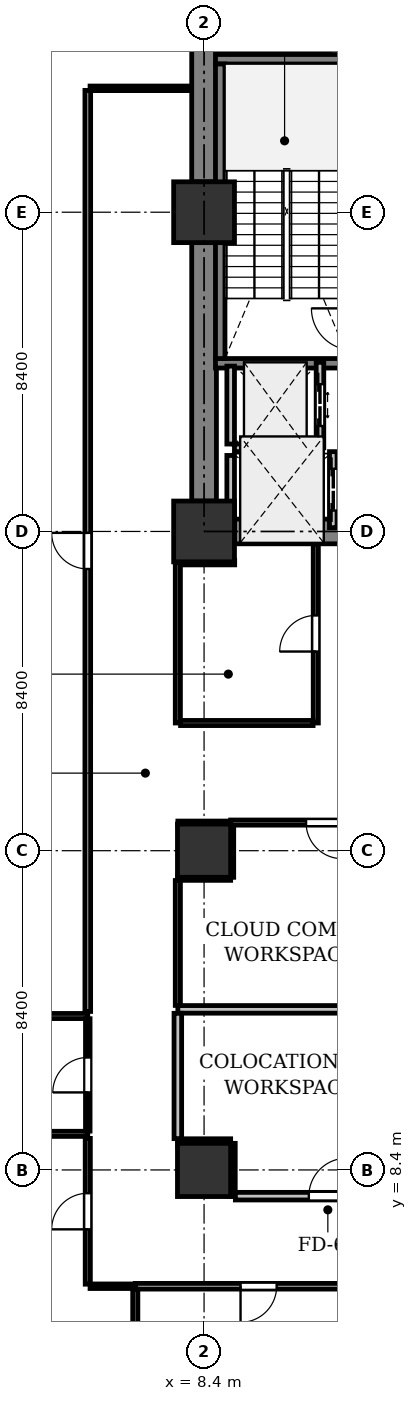
"""IFC4 building model, lengths in metres.
Left out: names, types, materials, properties, quantities, classifications, styles, units other than length and angle.
Written with IfcOpenShell. Run it as: python <this file> out.ifc"""

import sys

from ifc_helpers import new_model, si_unit, direction, frame, frame_2d, origin, origin_2d, place, context, subcontext, project, spatial, rectangle, extrude, element, fill, save


model = new_model("IFC4")
c1 = context("Model", 3, precision=1e-05, world=origin(), true_north=direction((0.0, 1.0)))
c2 = subcontext(c1, "Body", "Model", "MODEL_VIEW")
j1 = project(units=[si_unit("LENGTHUNIT", "METRE"), si_unit("PLANEANGLEUNIT", "RADIAN")], contexts=[c1])
p1 = place(None, origin())
s1 = spatial("IfcSite", under=j1, at=p1, CompositionType="ELEMENT")
p2 = place(p1, origin())
s2 = spatial("IfcBuilding", under=s1, at=p2, CompositionType="ELEMENT")
p3 = place(p2, frame((0.0, 0.0, 15.0)))
s3 = spatial("IfcBuildingStorey", under=s2, at=p3, CompositionType="ELEMENT", Elevation=15.0)
for number, where, z_axis, x_axis in (
    (1, (8.4, 8.4, 0.0), (0.0, 0.0, 1.0), (1.0, 0.0, 0.0)),
    (2, (8.4, 16.8, 0.0), (0.0, 0.0, 1.0), (1.0, 0.0, 0.0)),
):
    element("IfcColumn", number, at=place(p3, frame(where, z_axis=z_axis, x_axis=x_axis)), inside=s3, PredefinedType="COLUMN", context=c2, shape_type="SweptSolid", body=[
        extrude(rectangle(XDim=1.4, YDim=1.4, at=origin_2d()), origin(), (0.0, 0.0, 1.0), 4.8),
    ])
for number, where, z_axis, x_axis in (
    (3, (8.4, 25.2, 0.0), (0.0, 0.0, 1.0), (1.0, 0.0, 0.0)),
    (4, (8.4, 33.6, 0.0), (0.0, 0.0, 1.0), (1.0, 0.0, 0.0)),
):
    element("IfcColumn", number, at=place(p3, frame(where, z_axis=z_axis, x_axis=x_axis)), inside=s3, PredefinedType="COLUMN", context=c2, shape_type="SweptSolid", body=[
        extrude(rectangle(XDim=1.6, YDim=1.6, at=origin_2d()), origin(), (0.0, 0.0, 1.0), 4.8),
    ])
for number, where, z_axis, x_axis in (
    (5, (8.4, 26.0, 0.0), (0.0, 0.0, 1.0), (0.0, 1.0, 0.0)),
    (6, (8.4, 34.4, 0.0), (0.0, 0.0, 1.0), (0.0, 1.0, 0.0)),
):
    element("IfcWall", number, at=place(p3, frame(where, z_axis=z_axis, x_axis=x_axis)), inside=s3, PredefinedType="SHEAR", context=c2, shape_type="SweptSolid", body=[
        extrude(rectangle(XDim=6.8, YDim=0.65, at=frame_2d((3.4, 0.0))), origin(), (0.0, 0.0, 1.0), 4.45),
    ])
p4 = place(p3, frame((9.2, 25.2, 0.0), z_axis=(0.0, 0.0, 1.0), x_axis=(1.0, 0.0, 0.0)))
e7 = element("IfcWall", 7, at=p4, inside=s3, PredefinedType="SHEAR", context=c2, shape_type="SweptSolid", body=[
    extrude(rectangle(XDim=6.8, YDim=0.65, at=frame_2d((3.4, 0.0))), origin(), (0.0, 0.0, 1.0), 4.45),
])
p5 = place(p4, frame((3.5, 0.0, 0.0)))
e8 = element("IfcOpeningElement", 8, at=p5, cuts=e7, PredefinedType="OPENING", context=c2, shape_type="SweptSolid", body=[
    extrude(rectangle(XDim=1.1, YDim=2.15, at=frame_2d((0.55, 1.075))), frame((0.0, 0.335, 0.0), z_axis=(0.0, -1.0, 0.0), x_axis=(1.0, 0.0, 0.0)), (0.0, 0.0, 1.0), 0.67),
])
for number, where, z_axis, x_axis in (
    (9, (12.45, 29.625, 0.0), (0.0, 0.0, 1.0), (-1.0, 0.0, 0.0)),
    (10, (12.45, 37.625, 0.0), (0.0, 0.0, 1.0), (-1.0, 0.0, 0.0)),
):
    element("IfcWall", number, at=place(p3, frame(where, z_axis=z_axis, x_axis=x_axis)), inside=s3, PredefinedType="SHEAR", context=c2, shape_type="SweptSolid", body=[
        extrude(rectangle(XDim=3.75, YDim=0.25, at=frame_2d((1.875, 0.0))), origin(), (0.0, 0.0, 1.0), 4.45),
    ])
p6 = place(p3, frame((8.825, 29.75, 0.0), z_axis=(0.0, 0.0, 1.0), x_axis=(0.0, 1.0, 0.0)))
e11 = element("IfcWall", 11, at=p6, inside=s3, PredefinedType="SHEAR", context=c2, shape_type="SweptSolid", body=[
    extrude(rectangle(XDim=7.75, YDim=0.25, at=frame_2d((3.875, 0.0))), origin(), (0.0, 0.0, 1.0), 4.45),
])
p7 = place(p3, frame((11.45, 27.4, 0.0), z_axis=(0.0, 0.0, 1.0), x_axis=(0.0, 1.0, 0.0)))
e12 = element("IfcWall", 12, at=p7, inside=s3, PredefinedType="PARTITIONING", context=c2, shape_type="SweptSolid", body=[
    extrude(rectangle(XDim=2.25, YDim=0.2, at=frame_2d((1.125, 0.0))), origin(), (0.0, 0.0, 1.0), 4.45),
])
p8 = place(p7, frame((0.575, 0.0, 0.0)))
e13 = element("IfcOpeningElement", 13, at=p8, cuts=e12, PredefinedType="OPENING", context=c2, shape_type="SweptSolid", body=[
    extrude(rectangle(XDim=1.1, YDim=2.2, at=frame_2d((0.55, 1.1))), frame((0.0, 0.11, 0.0), z_axis=(0.0, -1.0, 0.0), x_axis=(1.0, 0.0, 0.0)), (0.0, 0.0, 1.0), 0.22),
])
p9 = place(p3, frame((9.1, 27.5, 0.0), z_axis=(0.0, 0.0, 1.0), x_axis=(0.0, 1.0, 0.0)))
e14 = element("IfcWall", 14, at=p9, inside=s3, PredefinedType="PARTITIONING", context=c2, shape_type="SweptSolid", body=[
    extrude(rectangle(XDim=2.05, YDim=0.2, at=frame_2d((1.025, 0.0))), origin(), (0.0, 0.0, 1.0), 4.45),
])
p10 = place(p3, frame((9.2, 27.4, 0.0), z_axis=(0.0, 0.0, 1.0), x_axis=(1.0, 0.0, 0.0)))
e15 = element("IfcWall", 15, at=p10, inside=s3, PredefinedType="PARTITIONING", context=c2, shape_type="SweptSolid", body=[
    extrude(rectangle(XDim=2.15, YDim=0.2, at=frame_2d((1.075, 0.0))), origin(), (0.0, 0.0, 1.0), 4.45),
])
p11 = place(p3, frame((11.8, 25.3, 0.0), z_axis=(0.0, 0.0, 1.0), x_axis=(0.0, 1.0, 0.0)))
e16 = element("IfcWall", 16, at=p11, inside=s3, PredefinedType="PARTITIONING", context=c2, shape_type="SweptSolid", body=[
    extrude(rectangle(XDim=2.0, YDim=0.2, at=frame_2d((1.0, 0.0))), origin(), (0.0, 0.0, 1.0), 4.45),
])
p12 = place(p11, frame((0.45, 0.0, 0.0)))
e17 = element("IfcOpeningElement", 17, at=p12, cuts=e16, PredefinedType="OPENING", context=c2, shape_type="SweptSolid", body=[
    extrude(rectangle(XDim=1.1, YDim=2.2, at=frame_2d((0.55, 1.1))), frame((0.0, 0.11, 0.0), z_axis=(0.0, -1.0, 0.0), x_axis=(1.0, 0.0, 0.0)), (0.0, 0.0, 1.0), 0.22),
])
p13 = place(p3, frame((9.1, 25.4, 0.0), z_axis=(0.0, 0.0, 1.0), x_axis=(0.0, 1.0, 0.0)))
e18 = element("IfcWall", 18, at=p13, inside=s3, PredefinedType="PARTITIONING", context=c2, shape_type="SweptSolid", body=[
    extrude(rectangle(XDim=1.8, YDim=0.2, at=frame_2d((0.9, 0.0))), origin(), (0.0, 0.0, 1.0), 4.45),
])
for number, where, z_axis, x_axis in (
    (19, (5.34, 12.45, 0.0), (0.0, 0.0, 1.0), (-1.0, 0.0, 0.0)),
    (20, (0.169, 9.35, 0.0), (0.0, 0.0, 1.0), (1.0, 0.0, 0.0)),
):
    element("IfcWall", number, at=place(p3, frame(where, z_axis=z_axis, x_axis=x_axis)), inside=s3, PredefinedType="PARTITIONING", context=c2, shape_type="SweptSolid", body=[
        extrude(rectangle(XDim=5.171, YDim=0.135, at=frame_2d((2.585, 0.0))), origin(), (0.0, 0.0, 1.0), 3.25),
    ])
p14 = place(p3, frame((5.34, 9.421, 0.0), z_axis=(0.0, 0.0, 1.0), x_axis=(0.0, 1.0, 0.0)))
e21 = element("IfcWall", 21, at=p14, inside=s3, PredefinedType="PARTITIONING", context=c2, shape_type="SweptSolid", body=[
    extrude(rectangle(XDim=2.957, YDim=0.12, at=frame_2d((1.479, 0.0))), origin(), (0.0, 0.0, 1.0), 4.45),
])
p15 = place(p14, frame((1.019, 0.0, 0.0)))
e22 = element("IfcOpeningElement", 22, at=p15, cuts=e21, PredefinedType="OPENING", context=c2, shape_type="SweptSolid", body=[
    extrude(rectangle(XDim=0.92, YDim=2.1, at=frame_2d((0.46, 1.05))), frame((0.0, 0.07, 0.0), z_axis=(0.0, -1.0, 0.0), x_axis=(1.0, 0.0, 0.0)), (0.0, 0.0, 1.0), 0.14),
])
p16 = place(p3, frame((11.34, 20.16, 0.0), z_axis=(0.0, 0.0, 1.0), x_axis=(0.0, 1.0, 0.0)))
e23 = element("IfcWall", 23, at=p16, inside=s3, PredefinedType="PARTITIONING", context=c2, shape_type="SweptSolid", body=[
    extrude(rectangle(XDim=4.711, YDim=0.135, at=frame_2d((2.355, 0.0))), origin(), (0.0, 0.0, 1.0), 4.45),
])
p17 = place(p16, frame((1.881, 0.0, 0.0)))
e24 = element("IfcOpeningElement", 24, at=p17, cuts=e23, PredefinedType="OPENING", context=c2, shape_type="SweptSolid", body=[
    extrude(rectangle(XDim=0.95, YDim=2.15, at=frame_2d((0.475, 1.075))), frame((0.0, 0.077, 0.0), z_axis=(0.0, -1.0, 0.0), x_axis=(1.0, 0.0, 0.0)), (0.0, 0.0, 1.0), 0.155),
])
p18 = place(p3, frame((9.206, 24.381, 0.0), z_axis=(0.0, 0.0, 1.0), x_axis=(-0.999999786895, -0.00065284791, 0.0)))
e25 = element("IfcWall", 25, at=p18, inside=s3, PredefinedType="PARTITIONING", context=c2, shape_type="SweptSolid", body=[
    extrude(rectangle(XDim=1.496, YDim=0.12, at=frame_2d((0.748, 0.0))), origin(), (0.0, 0.0, 1.0), 3.25),
])
p19 = place(p3, frame((7.71, 24.38, 0.0), z_axis=(0.0, 0.0, 1.0), x_axis=(0.0, -1.0, 0.0)))
e26 = element("IfcWall", 26, at=p19, inside=s3, PredefinedType="PARTITIONING", context=c2, shape_type="SweptSolid", body=[
    extrude(rectangle(XDim=4.22, YDim=0.135, at=frame_2d((2.11, 0.0))), origin(), (0.0, 0.0, 1.0), 4.45),
])
p20 = place(p3, frame((7.781, 20.16, 0.0), z_axis=(0.0, 0.0, 1.0), x_axis=(1.0, 0.0, 0.0)))
e27 = element("IfcWall", 27, at=p20, inside=s3, PredefinedType="PARTITIONING", context=c2, shape_type="SweptSolid", body=[
    extrude(rectangle(XDim=3.487, YDim=0.135, at=frame_2d((1.744, 0.0))), origin(), (0.0, 0.0, 1.0), 3.25),
])
p21 = place(p3, frame((7.71, 9.12, 0.0), z_axis=(0.0, 0.0, 1.0), x_axis=(1.0, 0.0, 0.0)))
e28 = element("IfcWall", 28, at=p21, inside=s3, PredefinedType="PARTITIONING", context=c2, shape_type="SweptSolid", body=[
    extrude(rectangle(XDim=1.39, YDim=0.2, at=frame_2d((0.695, 0.0))), origin(), (0.0, 0.0, 1.0), 3.25),
])
p22 = place(p3, frame((9.12, 9.1, 0.0), z_axis=(0.0, 0.0, 1.0), x_axis=(0.0, -1.0, 0.0)))
e29 = element("IfcWall", 29, at=p22, inside=s3, PredefinedType="PARTITIONING", context=c2, shape_type="SweptSolid", body=[
    extrude(rectangle(XDim=1.39, YDim=0.2, at=frame_2d((0.695, 0.0))), origin(), (0.0, 0.0, 1.0), 3.05),
])
p23 = place(p3, frame((9.224, 7.71, 0.0), z_axis=(0.0, 0.0, 1.0), x_axis=(1.0, 0.0, 0.0)))
e30 = element("IfcWall", 30, at=p23, inside=s3, PredefinedType="PARTITIONING", context=c2, shape_type="SweptSolid", body=[
    extrude(rectangle(XDim=4.866, YDim=0.2, at=frame_2d((2.433, 0.0))), origin(), (0.0, 0.0, 1.0), 4.044),
])
p24 = place(p23, frame((1.933, 0.0, 0.0)))
e31 = element("IfcOpeningElement", 31, at=p24, cuts=e30, PredefinedType="OPENING", context=c2, shape_type="SweptSolid", body=[
    extrude(rectangle(XDim=1.0, YDim=2.15, at=frame_2d((0.5, 1.075))), frame((0.0, 0.11, 0.0), z_axis=(0.0, -1.0, 0.0), x_axis=(1.0, 0.0, 0.0)), (0.0, 0.0, 1.0), 0.22),
])
p25 = place(p3, frame((13.986, 12.625, 0.0), z_axis=(0.0, 0.0, 1.0), x_axis=(-1.0, 0.0, 0.0)))
e32 = element("IfcWall", 32, at=p25, inside=s3, PredefinedType="PARTITIONING", context=c2, shape_type="SweptSolid", body=[
    extrude(rectangle(XDim=6.276, YDim=0.2, at=frame_2d((3.138, 0.0))), origin(), (0.0, 0.0, 1.0), 3.25),
])
p26 = place(p3, frame((7.71, 12.521, 0.0), z_axis=(0.0, 0.0, 1.0), x_axis=(0.0, -1.0, 0.0)))
e33 = element("IfcWall", 33, at=p26, inside=s3, PredefinedType="PARTITIONING", context=c2, shape_type="SweptSolid", body=[
    extrude(rectangle(XDim=3.297, YDim=0.2, at=frame_2d((1.648, 0.0))), origin(), (0.0, 0.0, 1.0), 4.45),
])
p27 = place(p3, frame((7.71, 17.52, 0.0), z_axis=(0.0, 0.0, 1.0), x_axis=(1.0, 0.0, 0.0)))
e34 = element("IfcWall", 34, at=p27, inside=s3, PredefinedType="PARTITIONING", context=c2, shape_type="SweptSolid", body=[
    extrude(rectangle(XDim=1.39, YDim=0.12, at=frame_2d((0.695, 0.0))), origin(), (0.0, 0.0, 1.0), 3.25),
])
p28 = place(p3, frame((9.12, 17.5, 0.0), z_axis=(0.0, 0.0, 1.0), x_axis=(0.0, -1.0, 0.0)))
e35 = element("IfcWall", 35, at=p28, inside=s3, PredefinedType="PARTITIONING", context=c2, shape_type="SweptSolid", body=[
    extrude(rectangle(XDim=1.4, YDim=0.12, at=frame_2d((0.7, 0.0))), origin(), (0.0, 0.0, 1.0), 3.05),
])
p29 = place(p3, frame((9.1, 16.08, 0.0), z_axis=(0.0, 0.0, 1.0), x_axis=(-1.0, 0.0, 0.0)))
e36 = element("IfcWall", 36, at=p29, inside=s3, PredefinedType="PARTITIONING", context=c2, shape_type="SweptSolid", body=[
    extrude(rectangle(XDim=1.39, YDim=0.12, at=frame_2d((0.695, 0.0))), origin(), (0.0, 0.0, 1.0), 3.25),
])
p30 = place(p3, frame((7.71, 16.016, 0.0), z_axis=(0.0, 0.0, 1.0), x_axis=(0.0, -1.0, 0.0)))
e37 = element("IfcWall", 37, at=p30, inside=s3, PredefinedType="PARTITIONING", context=c2, shape_type="SweptSolid", body=[
    extrude(rectangle(XDim=3.287, YDim=0.135, at=frame_2d((1.644, 0.0))), origin(), (0.0, 0.0, 1.0), 4.45),
])
p31 = place(p3, frame((14.019, 17.54, 0.0), z_axis=(0.0, 0.0, 1.0), x_axis=(-1.0, 0.0, 0.0)))
e38 = element("IfcWall", 38, at=p31, inside=s3, PredefinedType="PARTITIONING", context=c2, shape_type="SweptSolid", body=[
    extrude(rectangle(XDim=4.918, YDim=0.135, at=frame_2d((2.459, 0.0))), origin(), (0.0, 0.0, 1.0), 4.45),
])
p32 = place(p31, frame((1.984, 0.0, 0.0)))
e39 = element("IfcOpeningElement", 39, at=p32, cuts=e38, PredefinedType="OPENING", context=c2, shape_type="SweptSolid", body=[
    extrude(rectangle(XDim=0.95, YDim=2.15, at=frame_2d((0.475, 1.075))), frame((0.0, 0.077, 0.0), z_axis=(0.0, -1.0, 0.0), x_axis=(1.0, 0.0, 0.0)), (0.0, 0.0, 1.0), 0.155),
])
p33 = place(p3, frame((13.08, 5.34, 0.0), z_axis=(0.0, 0.0, 1.0), x_axis=(-1.0, 0.0, 0.0)))
e40 = element("IfcWall", 40, at=p33, inside=s3, PredefinedType="PARTITIONING", context=c2, shape_type="SweptSolid", body=[
    extrude(rectangle(XDim=6.49, YDim=0.15, at=frame_2d((3.245, 0.0))), origin(), (0.0, 0.0, 1.0), 3.25),
])
p34 = place(p33, frame((2.77, 0.0, 0.0)))
e41 = element("IfcOpeningElement", 41, at=p34, cuts=e40, PredefinedType="OPENING", context=c2, shape_type="SweptSolid", body=[
    extrude(rectangle(XDim=0.95, YDim=2.15, at=frame_2d((0.475, 1.075))), frame((0.0, 0.085, 0.0), z_axis=(0.0, -1.0, 0.0), x_axis=(1.0, 0.0, 0.0)), (0.0, 0.0, 1.0), 0.17),
])
p35 = place(p3, frame((6.59, 5.261, 0.0), z_axis=(0.0, 0.0, 1.0), x_axis=(0.0, -1.0, 0.0)))
e42 = element("IfcWall", 42, at=p35, inside=s3, PredefinedType="PARTITIONING", context=c2, shape_type="SweptSolid", body=[
    extrude(rectangle(XDim=5.137, YDim=0.135, at=frame_2d((2.568, 0.0))), origin(), (0.0, 0.0, 1.0), 3.05),
])
p36 = place(p3, frame((5.34, 5.394, 0.0), z_axis=(0.0, 0.0, 1.0), x_axis=(-6.3645621e-05, 0.999999997975, 0.0)))
e43 = element("IfcWall", 43, at=p36, inside=s3, PredefinedType="PARTITIONING", context=c2, shape_type="SweptSolid", body=[
    extrude(rectangle(XDim=3.836, YDim=0.135, at=frame_2d((1.918, 0.0))), origin(), (0.0, 0.0, 1.0), 3.05),
])
p37 = place(p36, frame((1.443, 0.0, 0.0)))
e44 = element("IfcOpeningElement", 44, at=p37, cuts=e43, PredefinedType="OPENING", context=c2, shape_type="SweptSolid", body=[
    extrude(rectangle(XDim=0.95, YDim=2.15, at=frame_2d((0.475, 1.075))), frame((0.0, 0.077, 0.0), z_axis=(0.0, -1.0, 0.0), x_axis=(1.0, 0.0, 0.0)), (0.0, 0.0, 1.0), 0.155),
])
p38 = place(p3, frame((6.57, 5.34, 0.0), z_axis=(0.0, 0.0, 1.0), x_axis=(-1.0, 0.0, 0.0)))
e45 = element("IfcWall", 45, at=p38, inside=s3, PredefinedType="PARTITIONING", context=c2, shape_type="SweptSolid", body=[
    extrude(rectangle(XDim=1.17, YDim=0.12, at=frame_2d((0.585, 0.0))), origin(), (0.0, 0.0, 1.0), 4.45),
])
p39 = place(p3, frame((5.34, 12.57, 0.0), z_axis=(0.0, 0.0, 1.0), x_axis=(1.0073537e-05, 0.999999999949, 0.0)))
e46 = element("IfcWall", 46, at=p39, inside=s3, PredefinedType="PARTITIONING", context=c2, shape_type="SweptSolid", body=[
    extrude(rectangle(XDim=24.236, YDim=0.15, at=frame_2d((12.118, 0.0))), origin(), (0.0, 0.0, 1.0), 3.05),
])
p40 = place(p39, frame((11.643, 0.0, 0.0)))
e47 = element("IfcOpeningElement", 47, at=p40, cuts=e46, PredefinedType="OPENING", context=c2, shape_type="SweptSolid", body=[
    extrude(rectangle(XDim=0.95, YDim=2.15, at=frame_2d((0.475, 1.075))), frame((0.0, 0.085, 0.0), z_axis=(0.0, -1.0, 0.0), x_axis=(1.0, 0.0, 0.0)), (0.0, 0.0, 1.0), 0.17),
])
p41 = place(p3, frame((5.4, 36.86, 0.0), z_axis=(0.0, 0.0, 1.0), x_axis=(1.0, 0.0, 0.0)))
e48 = element("IfcWall", 48, at=p41, inside=s3, PredefinedType="PARTITIONING", context=c2, shape_type="SweptSolid", body=[
    extrude(rectangle(XDim=2.671, YDim=0.12, at=frame_2d((1.335, 0.0))), origin(), (0.0, 0.0, 1.0), 4.45),
])
p42 = place(p8, origin())
e49 = element("IfcDoor", 49, at=p42, inside=s3, OperationType="DOUBLE_DOOR_SLIDING", PredefinedType="DOOR", context=c2, shape_type="SweptSolid", body=[
    extrude(rectangle(XDim=1.1, YDim=2.2, at=frame_2d((0.55, 1.1))), frame((0.0, 0.025, 0.0), z_axis=(0.0, -1.0, 0.0), x_axis=(1.0, 0.0, 0.0)), (0.0, 0.0, 1.0), 0.05),
])
fill(e13, e49)
p43 = place(p12, origin())
e50 = element("IfcDoor", 50, at=p43, inside=s3, OperationType="DOUBLE_DOOR_SLIDING", PredefinedType="DOOR", context=c2, shape_type="SweptSolid", body=[
    extrude(rectangle(XDim=1.1, YDim=2.2, at=frame_2d((0.55, 1.1))), frame((0.0, 0.025, 0.0), z_axis=(0.0, -1.0, 0.0), x_axis=(1.0, 0.0, 0.0)), (0.0, 0.0, 1.0), 0.05),
])
fill(e17, e50)
p44 = place(p15, origin())
e51 = element("IfcDoor", 51, at=p44, inside=s3, OperationType="SINGLE_SWING_LEFT", PredefinedType="DOOR", context=c2, shape_type="SweptSolid", body=[
    extrude(rectangle(XDim=0.92, YDim=2.1, at=frame_2d((0.46, 1.05))), frame((0.0, 0.025, 0.0), z_axis=(0.0, -1.0, 0.0), x_axis=(1.0, 0.0, 0.0)), (0.0, 0.0, 1.0), 0.05),
])
fill(e22, e51)
p45 = place(p17, origin())
e52 = element("IfcDoor", 52, at=p45, inside=s3, OperationType="SINGLE_SWING_LEFT", PredefinedType="DOOR", context=c2, shape_type="SweptSolid", body=[
    extrude(rectangle(XDim=0.95, YDim=2.15, at=frame_2d((0.475, 1.075))), frame((0.0, 0.025, 0.0), z_axis=(0.0, -1.0, 0.0), x_axis=(1.0, 0.0, 0.0)), (0.0, 0.0, 1.0), 0.05),
])
fill(e24, e52)
p46 = place(p24, origin())
e53 = element("IfcDoor", 53, at=p46, inside=s3, OperationType="SINGLE_SWING_RIGHT", PredefinedType="DOOR", context=c2, shape_type="SweptSolid", body=[
    extrude(rectangle(XDim=1.0, YDim=2.15, at=frame_2d((0.5, 1.075))), frame((0.0, 0.025, 0.0), z_axis=(0.0, -1.0, 0.0), x_axis=(1.0, 0.0, 0.0)), (0.0, 0.0, 1.0), 0.05),
])
fill(e31, e53)
p47 = place(p32, origin())
e54 = element("IfcDoor", 54, at=p47, inside=s3, OperationType="SINGLE_SWING_LEFT", PredefinedType="DOOR", context=c2, shape_type="SweptSolid", body=[
    extrude(rectangle(XDim=0.95, YDim=2.15, at=frame_2d((0.475, 1.075))), frame((0.0, 0.025, 0.0), z_axis=(0.0, -1.0, 0.0), x_axis=(1.0, 0.0, 0.0)), (0.0, 0.0, 1.0), 0.05),
])
fill(e39, e54)
p48 = place(p34, origin())
e55 = element("IfcDoor", 55, at=p48, inside=s3, OperationType="SINGLE_SWING_RIGHT", PredefinedType="DOOR", context=c2, shape_type="SweptSolid", body=[
    extrude(rectangle(XDim=0.95, YDim=2.15, at=frame_2d((0.475, 1.075))), frame((0.0, 0.025, 0.0), z_axis=(0.0, -1.0, 0.0), x_axis=(1.0, 0.0, 0.0)), (0.0, 0.0, 1.0), 0.05),
])
fill(e41, e55)
p49 = place(p37, origin())
e56 = element("IfcDoor", 56, at=p49, inside=s3, OperationType="SINGLE_SWING_LEFT", PredefinedType="DOOR", context=c2, shape_type="SweptSolid", body=[
    extrude(rectangle(XDim=0.95, YDim=2.15, at=frame_2d((0.475, 1.075))), frame((0.0, 0.025, 0.0), z_axis=(0.0, -1.0, 0.0), x_axis=(1.0, 0.0, 0.0)), (0.0, 0.0, 1.0), 0.05),
])
fill(e44, e56)
p50 = place(p40, origin())
e57 = element("IfcDoor", 57, at=p50, inside=s3, OperationType="SINGLE_SWING_RIGHT", PredefinedType="DOOR", context=c2, shape_type="SweptSolid", body=[
    extrude(rectangle(XDim=0.95, YDim=2.15, at=frame_2d((0.475, 1.075))), frame((0.0, 0.025, 0.0), z_axis=(0.0, -1.0, 0.0), x_axis=(1.0, 0.0, 0.0)), (0.0, 0.0, 1.0), 0.05),
])
fill(e47, e57)
save(model, sys.argv[1])
